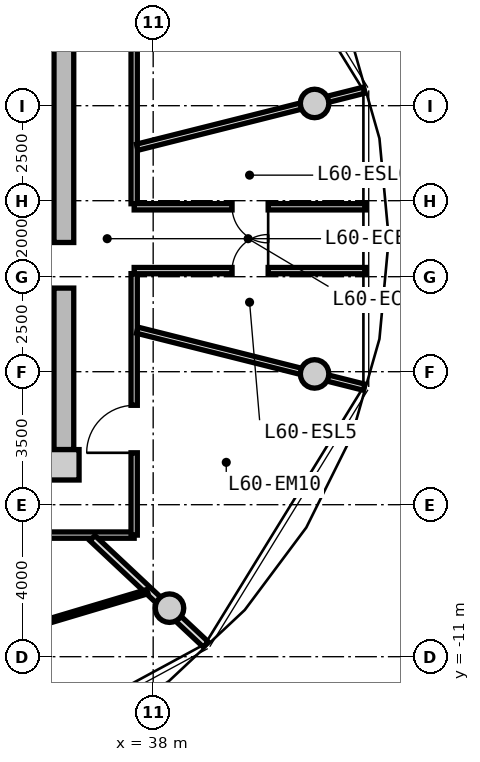
"""IFC4 building model, lengths in metres.
Left out: names, types, materials, properties, quantities, classifications, styles, units other than length and angle.
Written with IfcOpenShell. Run it as: python <this file> out.ifc"""

import sys

from ifc_helpers import new_model, si_unit, direction, frame, frame_2d, origin, origin_2d, place, context, subcontext, project, spatial, rectangle, circle, extrude, source, transform, mapped, element, fill, save


model = new_model("IFC4")
c1 = context("Model", 3, precision=1e-05, world=origin(), true_north=direction((0.0, 1.0)))
c2 = subcontext(c1, "Body", "Model", "MODEL_VIEW")
j1 = project(units=[si_unit("LENGTHUNIT", "METRE"), si_unit("PLANEANGLEUNIT", "RADIAN")], contexts=[c1])
p1 = place(None, origin())
s1 = spatial("IfcSite", under=j1, at=p1, CompositionType="ELEMENT")
p2 = place(p1, origin())
s2 = spatial("IfcBuilding", under=s1, at=p2, CompositionType="ELEMENT")
p3 = place(p2, frame((0.0, 0.0, 193.7)))
s3 = spatial("IfcBuildingStorey", under=s2, at=p3, CompositionType="ELEMENT", Elevation=193.7)
m1 = source(origin(), c2, "Body", "SweptSolid", [
    extrude(rectangle(XDim=0.8, YDim=0.8, at=origin_2d()), origin(), (0.0, 0.0, 1.0), 3.05),
])
p4 = place(p3, frame((35.65, -5.95, 0.0), z_axis=(0.0, 0.0, 1.0), x_axis=(1.0, 0.0, 0.0)))
e1 = element("IfcColumn", 1, at=p4, inside=s3, PredefinedType="COLUMN", context=c2, shape_type="MappedRepresentation", body=[
    mapped(m1, transform((0.0, 0.0, 0.0), x_axis=(1.0, 0.0, 0.0), y_axis=(0.0, 1.0, 0.0), z_axis=(0.0, 0.0, 1.0), scale=1.0)),
])
m2 = source(origin(), c2, "Body", "SweptSolid", [
    extrude(rectangle(XDim=11.1, YDim=0.52, at=frame_2d((5.55, 0.0))), origin(), (0.0, 0.0, 1.0), 2.81),
])
p5 = place(p3, frame((35.65, 5.55, 0.0), z_axis=(0.0, 0.0, 1.0), x_axis=(0.0, -1.0, 0.0)))
e2 = element("IfcWall", 2, at=p5, inside=s3, PredefinedType="SHEAR", context=c2, shape_type="MappedRepresentation", body=[
    mapped(m2, transform((0.0, 0.0, 0.0), x_axis=(1.0, 0.0, 0.0), y_axis=(0.0, 1.0, 0.0), z_axis=(0.0, 0.0, 1.0), scale=1.0)),
])
p6 = place(p5, frame((5.65, 0.0, 0.0)))
e3 = element("IfcOpeningElement", 3, at=p6, cuts=e2, PredefinedType="OPENING", context=c2, shape_type="SweptSolid", body=[
    extrude(rectangle(XDim=1.2, YDim=2.15, at=frame_2d((0.6, 1.075))), frame((0.0, 0.27, 0.0), z_axis=(0.0, -1.0, 0.0), x_axis=(1.0, 0.0, 0.0)), (0.0, 0.0, 1.0), 0.54),
])
m3 = source(origin(), c2, "Body", "SweptSolid", [
    extrude(circle(Radius=0.375, at=origin_2d()), origin(), (0.0, 0.0, 1.0), 3.05),
])
for number, where, z_axis, x_axis in (
    (4, (42.247, 3.559, 0.0), (0.0, 0.0, 1.0), (1.0, 0.0, 0.0)),
    (5, (38.43, -9.723, 0.0), (0.0, 0.0, 1.0), (1.0, 0.0, 0.0)),
    (6, (42.247, -3.559, 0.0), (0.0, 0.0, 1.0), (1.0, 0.0, 0.0)),
):
    element("IfcColumn", number, at=place(p3, frame(where, z_axis=z_axis, x_axis=x_axis)), inside=s3, PredefinedType="COLUMN", context=c2, shape_type="MappedRepresentation", body=[
        mapped(m3, transform((0.0, 0.0, 0.0), x_axis=(1.0, 0.0, 0.0), y_axis=(0.0, 1.0, 0.0), z_axis=(0.0, 0.0, 1.0), scale=1.0)),
    ])
m4 = source(origin(), c2, "Body", "SweptSolid", [
    extrude(rectangle(XDim=19.0, YDim=0.165, at=frame_2d((9.5, 0.0))), origin(), (0.0, 0.0, 1.0), 2.795),
])
p7 = place(p3, frame((37.5, -7.8, 0.0), z_axis=(0.0, 0.0, 1.0), x_axis=(-1.0, 0.0, 0.0)))
e7 = element("IfcWall", 7, at=p7, inside=s3, PredefinedType="PARTITIONING", context=c2, shape_type="MappedRepresentation", body=[
    mapped(m4, transform((0.0, 0.0, 0.0), x_axis=(1.0, 0.0, 0.0), y_axis=(0.0, 1.0, 0.0), z_axis=(0.0, 0.0, 1.0), scale=1.0)),
])
p8 = place(p7, frame((9.392, 0.0, 0.0)))
e8 = element("IfcOpeningElement", 8, at=p8, cuts=e7, PredefinedType="OPENING", context=c2, shape_type="SweptSolid", body=[
    extrude(rectangle(XDim=1.05, YDim=2.15, at=frame_2d((0.525, 1.075))), frame((0.0, 0.093, 0.0), z_axis=(0.0, -1.0, 0.0), x_axis=(1.0, 0.0, 0.0)), (0.0, 0.0, 1.0), 0.185),
])
m5 = source(origin(), c2, "Body", "SweptSolid", [
    extrude(rectangle(XDim=6.88, YDim=0.165, at=frame_2d((3.44, 0.0))), origin(), (0.0, 0.0, 1.0), 2.795),
])
p9 = place(p3, frame((37.5, 7.8, 0.0), z_axis=(0.0, 0.0, 1.0), x_axis=(0.0, -1.0, 0.0)))
e9 = element("IfcWall", 9, at=p9, inside=s3, PredefinedType="PARTITIONING", context=c2, shape_type="MappedRepresentation", body=[
    mapped(m5, transform((0.0, 0.0, 0.0), x_axis=(1.0, 0.0, 0.0), y_axis=(0.0, 1.0, 0.0), z_axis=(0.0, 0.0, 1.0), scale=1.0)),
])
p10 = place(p3, frame((37.5, -0.92, 0.0), z_axis=(0.0, 0.0, 1.0), x_axis=(0.0, -1.0, 0.0)))
e10 = element("IfcWall", 10, at=p10, inside=s3, PredefinedType="PARTITIONING", context=c2, shape_type="MappedRepresentation", body=[
    mapped(m5, transform((0.0, 0.0, 0.0), x_axis=(1.0, 0.0, 0.0), y_axis=(0.0, 1.0, 0.0), z_axis=(0.0, 0.0, 1.0), scale=1.0)),
])
p11 = place(p10, frame((3.464, 0.0, 0.0)))
e11 = element("IfcOpeningElement", 11, at=p11, cuts=e10, PredefinedType="OPENING", context=c2, shape_type="SweptSolid", body=[
    extrude(rectangle(XDim=1.25, YDim=2.2, at=frame_2d((0.625, 1.1))), frame((0.0, 0.093, 0.0), z_axis=(0.0, -1.0, 0.0), x_axis=(1.0, 0.0, 0.0)), (0.0, 0.0, 1.0), 0.185),
])
m6 = source(origin(), c2, "Body", "SweptSolid", [
    extrude(rectangle(XDim=6.157, YDim=0.165, at=frame_2d((3.079, 0.0))), origin(), (0.0, 0.0, 1.0), 2.395),
])
for number, where, z_axis, x_axis in (
    (12, (37.58, -2.407, 0.0), (0.0, 0.0, 1.0), (0.97, -0.244, 0.0)),
    (13, (37.58, 2.407, 0.0), (0.0, 0.0, 1.0), (0.97, 0.244, 0.0)),
):
    element("IfcWall", number, at=place(p3, frame(where, z_axis=z_axis, x_axis=x_axis)), inside=s3, PredefinedType="PARTITIONING", context=c2, shape_type="MappedRepresentation", body=[
        mapped(m6, transform((0.0, 0.0, 0.0), x_axis=(1.0, 0.0, 0.0), y_axis=(0.0, 1.0, 0.0), z_axis=(0.0, 0.0, 1.0), scale=1.0)),
    ])
m7 = source(origin(), c2, "Body", "SweptSolid", [
    extrude(rectangle(XDim=6.101, YDim=0.165, at=frame_2d((3.051, 0.0))), origin(), (0.0, 0.0, 1.0), 2.795),
])
p12 = place(p3, frame((37.5, 0.84, 0.0), z_axis=(0.0, 0.0, 1.0), x_axis=(1.0, 0.0, 0.0)))
e14 = element("IfcWall", 14, at=p12, inside=s3, PredefinedType="PARTITIONING", context=c2, shape_type="MappedRepresentation", body=[
    mapped(m7, transform((0.0, 0.0, 0.0), x_axis=(1.0, 0.0, 0.0), y_axis=(0.0, 1.0, 0.0), z_axis=(0.0, 0.0, 1.0), scale=1.0)),
])
p13 = place(p12, frame((2.576, 0.0, 0.0)))
e15 = element("IfcOpeningElement", 15, at=p13, cuts=e14, PredefinedType="OPENING", context=c2, shape_type="SweptSolid", body=[
    extrude(rectangle(XDim=0.95, YDim=2.1, at=frame_2d((0.475, 1.05))), frame((0.0, 0.093, 0.0), z_axis=(0.0, -1.0, 0.0), x_axis=(1.0, 0.0, 0.0)), (0.0, 0.0, 1.0), 0.185),
])
p14 = place(p3, frame((43.601, -0.84, 0.0), z_axis=(0.0, 0.0, 1.0), x_axis=(-1.0, 0.0, 0.0)))
e16 = element("IfcWall", 16, at=p14, inside=s3, PredefinedType="PARTITIONING", context=c2, shape_type="MappedRepresentation", body=[
    mapped(m7, transform((0.0, 0.0, 0.0), x_axis=(1.0, 0.0, 0.0), y_axis=(0.0, 1.0, 0.0), z_axis=(0.0, 0.0, 1.0), scale=1.0)),
])
p15 = place(p14, frame((2.576, 0.0, 0.0)))
e17 = element("IfcOpeningElement", 17, at=p15, cuts=e16, PredefinedType="OPENING", context=c2, shape_type="SweptSolid", body=[
    extrude(rectangle(XDim=0.95, YDim=2.1, at=frame_2d((0.475, 1.05))), frame((0.0, 0.093, 0.0), z_axis=(0.0, -1.0, 0.0), x_axis=(1.0, 0.0, 0.0)), (0.0, 0.0, 1.0), 0.185),
])
m8 = source(origin(), c2, "Body", "SweptSolid", [
    extrude(rectangle(XDim=4.089, YDim=0.19, at=frame_2d((2.044, 0.0))), origin(), (0.0, 0.0, 1.0), 2.395),
])
p16 = place(p3, frame((36.402, -7.88, 0.0), z_axis=(0.0, 0.0, 1.0), x_axis=(0.729401273609, -0.684086092577, 0.0)))
e18 = element("IfcWall", 18, at=p16, inside=s3, PredefinedType="PARTITIONING", context=c2, shape_type="MappedRepresentation", body=[
    mapped(m8, transform((0.0, 0.0, 0.0), x_axis=(1.0, 0.0, 0.0), y_axis=(0.0, 1.0, 0.0), z_axis=(0.0, 0.0, 1.0), scale=1.0)),
])
m9 = source(origin(), c2, "Body", "SweptSolid", [
    extrude(rectangle(XDim=6.936, YDim=0.115, at=frame_2d((3.468, 0.0))), origin(), (0.0, 0.0, 1.0), 2.795),
])
p17 = place(p3, frame((31.203, -11.272, 0.0), z_axis=(0.0, 0.0, 1.0), x_axis=(0.958186895835, 0.286143098205, 0.0)))
e19 = element("IfcWall", 19, at=p17, inside=s3, PredefinedType="PARTITIONING", context=c2, shape_type="MappedRepresentation", body=[
    mapped(m9, transform((0.0, 0.0, 0.0), x_axis=(1.0, 0.0, 0.0), y_axis=(0.0, 1.0, 0.0), z_axis=(0.0, 0.0, 1.0), scale=1.0)),
])
p18 = place(p17, frame((2.993, 0.0, 0.0)))
e20 = element("IfcOpeningElement", 20, at=p18, cuts=e19, PredefinedType="OPENING", context=c2, shape_type="SweptSolid", body=[
    extrude(rectangle(XDim=0.95, YDim=2.1, at=frame_2d((0.475, 1.05))), frame((0.0, 0.067, 0.0), z_axis=(0.0, -1.0, 0.0), x_axis=(1.0, 0.0, 0.0)), (0.0, 0.0, 1.0), 0.135),
])
m10 = source(origin(), c2, "Body", "SweptSolid", [
    extrude(rectangle(XDim=1.2, YDim=2.15, at=frame_2d((0.6, 1.075))), frame((0.0, 0.025, 0.0), z_axis=(0.0, -1.0, 0.0), x_axis=(1.0, 0.0, 0.0)), (0.0, 0.0, 1.0), 0.05),
])
p19 = place(p6, frame((1.2, 0.0, 0.0), z_axis=(0.0, 0.0, 1.0), x_axis=(-1.0, 0.0, 0.0)))
e21 = element("IfcDoor", 21, at=p19, inside=s3, OperationType="SINGLE_SWING_RIGHT", PredefinedType="DOOR", context=c2, shape_type="MappedRepresentation", body=[
    mapped(m10, transform((0.0, 0.0, 0.0), x_axis=(1.0, 0.0, 0.0), y_axis=(0.0, 1.0, 0.0), z_axis=(0.0, 0.0, 1.0), scale=1.0)),
])
fill(e3, e21)
m11 = source(origin(), c2, "Body", "SweptSolid", [
    extrude(rectangle(XDim=0.95, YDim=2.1, at=frame_2d((0.475, 1.05))), frame((0.0, 0.025, 0.0), z_axis=(0.0, -1.0, 0.0), x_axis=(1.0, 0.0, 0.0)), (0.0, 0.0, 1.0), 0.05),
])
p20 = place(p15, frame((0.95, 0.0, 0.0), z_axis=(0.0, 0.0, 1.0), x_axis=(-1.0, 0.0, 0.0)))
e22 = element("IfcDoor", 22, at=p20, inside=s3, OperationType="SINGLE_SWING_RIGHT", PredefinedType="DOOR", context=c2, shape_type="MappedRepresentation", body=[
    mapped(m11, transform((0.0, 0.0, 0.0), x_axis=(1.0, 0.0, 0.0), y_axis=(0.0, 1.0, 0.0), z_axis=(0.0, 0.0, 1.0), scale=1.0)),
])
fill(e17, e22)
p21 = place(p13, frame((0.95, 0.0, 0.0), z_axis=(0.0, 0.0, 1.0), x_axis=(-1.0, 0.0, 0.0)))
e23 = element("IfcDoor", 23, at=p21, inside=s3, OperationType="SINGLE_SWING_LEFT", PredefinedType="DOOR", context=c2, shape_type="MappedRepresentation", body=[
    mapped(m11, transform((0.0, 0.0, 0.0), x_axis=(1.0, 0.0, 0.0), y_axis=(0.0, 1.0, 0.0), z_axis=(0.0, 0.0, 1.0), scale=1.0)),
])
fill(e15, e23)
m12 = source(origin(), c2, "Body", "SweptSolid", [
    extrude(rectangle(XDim=1.25, YDim=2.2, at=frame_2d((0.625, 1.1))), frame((0.0, 0.025, 0.0), z_axis=(0.0, -1.0, 0.0), x_axis=(1.0, 0.0, 0.0)), (0.0, 0.0, 1.0), 0.05),
])
p22 = place(p11, frame((1.25, 0.0, 0.0), z_axis=(0.0, 0.0, 1.0), x_axis=(-1.0, 0.0, 0.0)))
e24 = element("IfcDoor", 24, at=p22, inside=s3, OperationType="SINGLE_SWING_LEFT", PredefinedType="DOOR", context=c2, shape_type="MappedRepresentation", body=[
    mapped(m12, transform((0.0, 0.0, 0.0), x_axis=(1.0, 0.0, 0.0), y_axis=(0.0, 1.0, 0.0), z_axis=(0.0, 0.0, 1.0), scale=1.0)),
])
fill(e11, e24)
save(model, sys.argv[1])
